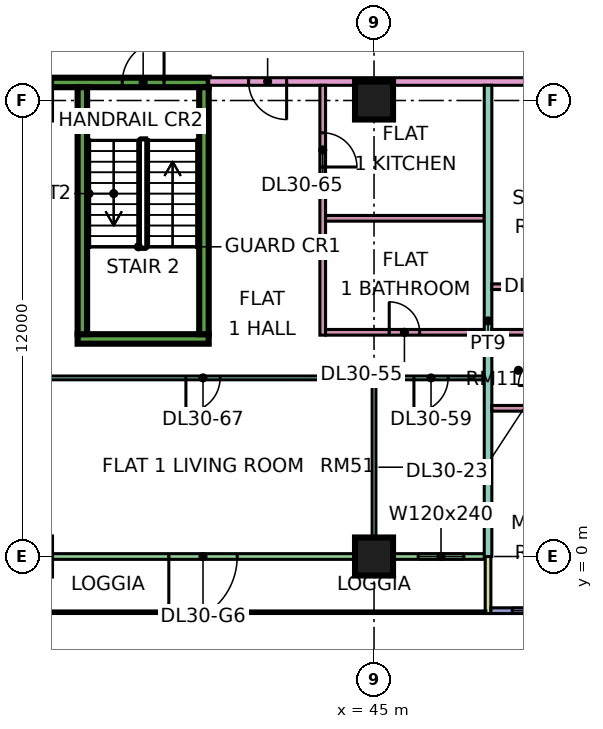
"""IFC4 building model, lengths in metres.
Left out: names, types, materials, properties, quantities, classifications, styles, units other than length and angle.
Written with IfcOpenShell. Run it as: python <this file> out.ifc"""

import sys

from ifc_helpers import new_model, si_unit, direction, frame, frame_2d, origin, origin_2d, place, context, subcontext, project, spatial, rectangle, extrude, element, fill, save


model = new_model("IFC4")
c1 = context("Model", 3, precision=1e-05, world=origin(), true_north=direction((0.0, 1.0)))
c2 = subcontext(c1, "Body", "Model", "MODEL_VIEW")
j1 = project(units=[si_unit("LENGTHUNIT", "METRE"), si_unit("PLANEANGLEUNIT", "RADIAN")], contexts=[c1])
p1 = place(None, origin())
s1 = spatial("IfcSite", under=j1, at=p1, CompositionType="ELEMENT")
p2 = place(p1, origin())
s2 = spatial("IfcBuilding", under=s1, at=p2, CompositionType="ELEMENT")
p3 = place(p2, frame((0.0, 0.0, 129.4)))
s3 = spatial("IfcBuildingStorey", under=s2, at=p3, CompositionType="ELEMENT", Elevation=129.4)
for number, where, z_axis, x_axis in (
    (1, (45.0, 0.0, 0.0), (0.0, 0.0, 1.0), (1.0, 0.0, 0.0)),
    (2, (45.0, 12.0, 0.0), (0.0, 0.0, 1.0), (1.0, 0.0, 0.0)),
):
    element("IfcColumn", number, at=place(p3, frame(where, z_axis=z_axis, x_axis=x_axis)), inside=s3, PredefinedType="COLUMN", context=c2, shape_type="SweptSolid", body=[
        extrude(rectangle(XDim=1.0, YDim=1.0, at=origin_2d()), origin(), (0.0, 0.0, 1.0), 3.75),
    ])
p4 = place(p3, frame((37.2, 5.725, 0.0), z_axis=(0.0, 0.0, 1.0), x_axis=(1.0, 0.0, 0.0)))
e3 = element("IfcWall", 3, at=p4, inside=s3, PredefinedType="SHEAR", context=c2, shape_type="SweptSolid", body=[
    extrude(rectangle(XDim=3.45, YDim=0.25, at=frame_2d((1.725, 0.0))), origin(), (0.0, 0.0, 1.0), 3.75),
])
p5 = place(p3, frame((36.5, 12.475, 0.0), z_axis=(0.0, 0.0, 1.0), x_axis=(1.0, 0.0, 0.0)))
e4 = element("IfcWall", 4, at=p5, inside=s3, PredefinedType="SHEAR", context=c2, shape_type="SweptSolid", body=[
    extrude(rectangle(XDim=4.15, YDim=0.25, at=frame_2d((2.075, 0.0))), origin(), (0.0, 0.0, 1.0), 3.75),
])
p6 = place(p5, frame((1.875, 0.0, 0.0)))
e5 = element("IfcOpeningElement", 5, at=p6, cuts=e4, PredefinedType="OPENING", context=c2, shape_type="SweptSolid", body=[
    extrude(rectangle(XDim=1.1, YDim=2.2, at=frame_2d((0.55, 1.1))), frame((0.0, 0.135, 0.0), z_axis=(0.0, -1.0, 0.0), x_axis=(1.0, 0.0, 0.0)), (0.0, 0.0, 1.0), 0.27),
])
for number, where, z_axis, x_axis in (
    (6, (37.325, 5.85, 0.0), (0.0, 0.0, 1.0), (0.0, 1.0, 0.0)),
    (7, (40.525, 5.85, 0.0), (0.0, 0.0, 1.0), (0.0, 1.0, 0.0)),
):
    element("IfcWall", number, at=place(p3, frame(where, z_axis=z_axis, x_axis=x_axis)), inside=s3, PredefinedType="SHEAR", context=c2, shape_type="SweptSolid", body=[
        extrude(rectangle(XDim=6.5, YDim=0.25, at=frame_2d((3.25, 0.0))), origin(), (0.0, 0.0, 1.0), 3.75),
    ])
p7 = place(p3, frame((36.075, 0.0, 0.0), z_axis=(0.0, 0.0, 1.0), x_axis=(1.0, 0.0, 0.0)))
e8 = element("IfcWall", 8, at=p7, inside=s3, PredefinedType="SOLIDWALL", context=c2, shape_type="SweptSolid", body=[
    extrude(rectangle(XDim=11.85, YDim=0.15, at=frame_2d((5.925, 0.0))), origin(), (0.0, 0.0, 1.0), 3.35),
])
p8 = place(p7, frame((3.525, 0.0, 0.0)))
e9 = element("IfcOpeningElement", 9, at=p8, cuts=e8, PredefinedType="OPENING", context=c2, shape_type="SweptSolid", body=[
    extrude(rectangle(XDim=1.8, YDim=2.4, at=frame_2d((0.9, 1.2))), frame((0.0, 0.085, 0.0), z_axis=(0.0, -1.0, 0.0), x_axis=(1.0, 0.0, 0.0)), (0.0, 0.0, 1.0), 0.17),
])
p9 = place(p7, frame((10.087, 0.0, 0.45)))
e10 = element("IfcOpeningElement", 10, at=p9, cuts=e8, PredefinedType="OPENING", context=c2, shape_type="SweptSolid", body=[
    extrude(rectangle(XDim=1.2, YDim=2.4, at=frame_2d((0.6, 1.2))), frame((0.0, 0.085, 0.0), z_axis=(0.0, -1.0, 0.0), x_axis=(1.0, 0.0, 0.0)), (0.0, 0.0, 1.0), 0.17),
])
p10 = place(p3, frame((48.0, -1.5, 0.0), z_axis=(0.0, 0.0, 1.0), x_axis=(0.0, 1.0, 0.0)))
e11 = element("IfcWall", 11, at=p10, inside=s3, PredefinedType="SOLIDWALL", context=c2, shape_type="SweptSolid", body=[
    extrude(rectangle(XDim=1.5, YDim=0.15, at=frame_2d((0.75, 0.0))), origin(), (0.0, 0.0, 1.0), 3.35),
])
p11 = place(p3, frame((48.075, -1.425, 0.0), z_axis=(0.0, 0.0, 1.0), x_axis=(1.0, 0.0, 0.0)))
e12 = element("IfcWall", 12, at=p11, inside=s3, PredefinedType="SOLIDWALL", context=c2, shape_type="SweptSolid", body=[
    extrude(rectangle(XDim=11.85, YDim=0.15, at=frame_2d((5.925, 0.0))), origin(), (0.0, 0.0, 1.0), 3.35),
])
p12 = place(p11, frame((0.562, 0.0, 0.45)))
e13 = element("IfcOpeningElement", 13, at=p12, cuts=e12, PredefinedType="OPENING", context=c2, shape_type="SweptSolid", body=[
    extrude(rectangle(XDim=1.8, YDim=2.4, at=frame_2d((0.9, 1.2))), frame((0.0, 0.085, 0.0), z_axis=(0.0, -1.0, 0.0), x_axis=(1.0, 0.0, 0.0)), (0.0, 0.0, 1.0), 0.17),
])
p13 = place(p11, frame((3.525, 0.0, 0.45)))
e14 = element("IfcOpeningElement", 14, at=p13, cuts=e12, PredefinedType="OPENING", context=c2, shape_type="SweptSolid", body=[
    extrude(rectangle(XDim=1.8, YDim=2.4, at=frame_2d((0.9, 1.2))), frame((0.0, 0.085, 0.0), z_axis=(0.0, -1.0, 0.0), x_axis=(1.0, 0.0, 0.0)), (0.0, 0.0, 1.0), 0.17),
])
p14 = place(p11, frame((6.525, 0.0, 0.45)))
e15 = element("IfcOpeningElement", 15, at=p14, cuts=e12, PredefinedType="OPENING", context=c2, shape_type="SweptSolid", body=[
    extrude(rectangle(XDim=1.8, YDim=2.4, at=frame_2d((0.9, 1.2))), frame((0.0, 0.085, 0.0), z_axis=(0.0, -1.0, 0.0), x_axis=(1.0, 0.0, 0.0)), (0.0, 0.0, 1.0), 0.17),
])
p15 = place(p11, frame((9.488, 0.0, 0.45)))
e16 = element("IfcOpeningElement", 16, at=p15, cuts=e12, PredefinedType="OPENING", context=c2, shape_type="SweptSolid", body=[
    extrude(rectangle(XDim=1.8, YDim=2.4, at=frame_2d((0.9, 1.2))), frame((0.0, 0.085, 0.0), z_axis=(0.0, -1.0, 0.0), x_axis=(1.0, 0.0, 0.0)), (0.0, 0.0, 1.0), 0.17),
])
p16 = place(p3, frame((33.05, 4.7, 0.0), z_axis=(0.0, 0.0, 1.0), x_axis=(1.0, 0.0, 0.0)))
e17 = element("IfcWall", 17, at=p16, inside=s3, PredefinedType="PARTITIONING", context=c2, shape_type="SweptSolid", body=[
    extrude(rectangle(XDim=14.85, YDim=0.1, at=frame_2d((7.425, 0.0))), origin(), (0.0, 0.0, 1.0), 3.35),
])
p17 = place(p16, frame((1.0, 0.0, 0.0)))
e18 = element("IfcOpeningElement", 18, at=p17, cuts=e17, PredefinedType="OPENING", context=c2, shape_type="SweptSolid", body=[
    extrude(rectangle(XDim=0.9, YDim=2.1, at=frame_2d((0.45, 1.05))), frame((0.0, 0.06, 0.0), z_axis=(0.0, -1.0, 0.0), x_axis=(1.0, 0.0, 0.0)), (0.0, 0.0, 1.0), 0.12),
])
p18 = place(p16, frame((13.0, 0.0, 0.0)))
e19 = element("IfcOpeningElement", 19, at=p18, cuts=e17, PredefinedType="OPENING", context=c2, shape_type="SweptSolid", body=[
    extrude(rectangle(XDim=0.9, YDim=2.1, at=frame_2d((0.45, 1.05))), frame((0.0, 0.06, 0.0), z_axis=(0.0, -1.0, 0.0), x_axis=(1.0, 0.0, 0.0)), (0.0, 0.0, 1.0), 0.12),
])
p19 = place(p16, frame((7.0, 0.0, 0.0)))
e20 = element("IfcOpeningElement", 20, at=p19, cuts=e17, PredefinedType="OPENING", context=c2, shape_type="SweptSolid", body=[
    extrude(rectangle(XDim=0.9, YDim=2.1, at=frame_2d((0.45, 1.05))), frame((0.0, 0.06, 0.0), z_axis=(0.0, -1.0, 0.0), x_axis=(1.0, 0.0, 0.0)), (0.0, 0.0, 1.0), 0.12),
])
p20 = place(p3, frame((40.65, 12.5, 0.0), z_axis=(0.0, 0.0, 1.0), x_axis=(1.0, 0.0, 0.0)))
e21 = element("IfcWall", 21, at=p20, inside=s3, PredefinedType="PARTITIONING", context=c2, shape_type="SweptSolid", body=[
    extrude(rectangle(XDim=31.276, YDim=0.2, at=frame_2d((15.638, 0.0))), origin(), (0.0, 0.0, 1.0), 3.35),
])
p21 = place(p20, frame((29.1, 0.0, 0.0)))
e22 = element("IfcOpeningElement", 22, at=p21, cuts=e21, PredefinedType="OPENING", context=c2, shape_type="SweptSolid", body=[
    extrude(rectangle(XDim=1.0, YDim=2.1, at=frame_2d((0.5, 1.05))), frame((0.0, 0.11, 0.0), z_axis=(0.0, -1.0, 0.0), x_axis=(1.0, 0.0, 0.0)), (0.0, 0.0, 1.0), 0.22),
])
p22 = place(p20, frame((1.05, 0.0, 0.0)))
e23 = element("IfcOpeningElement", 23, at=p22, cuts=e21, PredefinedType="OPENING", context=c2, shape_type="SweptSolid", body=[
    extrude(rectangle(XDim=1.0, YDim=2.1, at=frame_2d((0.5, 1.05))), frame((0.0, 0.11, 0.0), z_axis=(0.0, -1.0, 0.0), x_axis=(1.0, 0.0, 0.0)), (0.0, 0.0, 1.0), 0.22),
])
p23 = place(p3, frame((43.65, 5.825, 0.0), z_axis=(0.0, 0.0, 1.0), x_axis=(0.0, 1.0, 0.0)))
e24 = element("IfcWall", 24, at=p23, inside=s3, PredefinedType="PARTITIONING", context=c2, shape_type="SweptSolid", body=[
    extrude(rectangle(XDim=6.575, YDim=0.15, at=frame_2d((3.288, 0.0))), origin(), (0.0, 0.0, 1.0), 3.35),
])
p24 = place(p23, frame((4.425, 0.0, 0.0)))
e25 = element("IfcOpeningElement", 25, at=p24, cuts=e24, PredefinedType="OPENING", context=c2, shape_type="SweptSolid", body=[
    extrude(rectangle(XDim=0.9, YDim=2.1, at=frame_2d((0.45, 1.05))), frame((0.0, 0.085, 0.0), z_axis=(0.0, -1.0, 0.0), x_axis=(1.0, 0.0, 0.0)), (0.0, 0.0, 1.0), 0.17),
])
p25 = place(p3, frame((43.725, 5.9, 0.0), z_axis=(0.0, 0.0, 1.0), x_axis=(1.0, 0.0, 0.0)))
e26 = element("IfcWall", 26, at=p25, inside=s3, PredefinedType="PARTITIONING", context=c2, shape_type="SweptSolid", body=[
    extrude(rectangle(XDim=4.175, YDim=0.15, at=frame_2d((2.087, 0.0))), origin(), (0.0, 0.0, 1.0), 3.35),
])
p26 = place(p25, frame((1.675, 0.0, 0.0)))
e27 = element("IfcOpeningElement", 27, at=p26, cuts=e26, PredefinedType="OPENING", context=c2, shape_type="SweptSolid", body=[
    extrude(rectangle(XDim=0.8, YDim=2.1, at=frame_2d((0.4, 1.05))), frame((0.0, 0.085, 0.0), z_axis=(0.0, -1.0, 0.0), x_axis=(1.0, 0.0, 0.0)), (0.0, 0.0, 1.0), 0.17),
])
p27 = place(p3, frame((43.725, 8.9, 0.0), z_axis=(0.0, 0.0, 1.0), x_axis=(1.0, 0.0, 0.0)))
e28 = element("IfcWall", 28, at=p27, inside=s3, PredefinedType="PARTITIONING", context=c2, shape_type="SweptSolid", body=[
    extrude(rectangle(XDim=4.175, YDim=0.15, at=frame_2d((2.087, 0.0))), origin(), (0.0, 0.0, 1.0), 3.35),
])
p28 = place(p3, frame((45.0, 0.074, 0.0), z_axis=(0.0, 0.0, 1.0), x_axis=(0.0, 1.0, 0.0)))
e29 = element("IfcWall", 29, at=p28, inside=s3, PredefinedType="PARTITIONING", context=c2, shape_type="SweptSolid", body=[
    extrude(rectangle(XDim=4.576, YDim=0.1, at=frame_2d((2.288, 0.0))), origin(), (0.0, 0.0, 1.0), 3.35),
])
p29 = place(p3, frame((48.0, 0.0, 0.0), z_axis=(0.0, 0.0, 1.0), x_axis=(0.0, 1.0, 0.0)))
e30 = element("IfcWall", 30, at=p29, inside=s3, PredefinedType="PARTITIONING", context=c2, shape_type="SweptSolid", body=[
    extrude(rectangle(XDim=12.4, YDim=0.2, at=frame_2d((6.2, 0.0))), origin(), (0.0, 0.0, 1.0), 3.35),
])
p30 = place(p3, frame((48.1, 3.9, 0.0), z_axis=(0.0, 0.0, 1.0), x_axis=(1.0, 0.0, 0.0)))
e31 = element("IfcWall", 31, at=p30, inside=s3, PredefinedType="PARTITIONING", context=c2, shape_type="SweptSolid", body=[
    extrude(rectangle(XDim=1.425, YDim=0.15, at=frame_2d((0.712, 0.0))), origin(), (0.0, 0.0, 1.0), 3.35),
])
p31 = place(p3, frame((48.1, 5.9, 0.0), z_axis=(0.0, 0.0, 1.0), x_axis=(1.0, 0.0, 0.0)))
e32 = element("IfcWall", 32, at=p31, inside=s3, PredefinedType="PARTITIONING", context=c2, shape_type="SweptSolid", body=[
    extrude(rectangle(XDim=25.25, YDim=0.15, at=frame_2d((12.625, 0.0))), origin(), (0.0, 0.0, 1.0), 3.35),
])
p32 = place(p31, frame((6.95, 0.0, 0.0)))
e33 = element("IfcOpeningElement", 33, at=p32, cuts=e32, PredefinedType="OPENING", context=c2, shape_type="SweptSolid", body=[
    extrude(rectangle(XDim=0.9, YDim=2.1, at=frame_2d((0.45, 1.05))), frame((0.0, 0.085, 0.0), z_axis=(0.0, -1.0, 0.0), x_axis=(1.0, 0.0, 0.0)), (0.0, 0.0, 1.0), 0.17),
])
p33 = place(p31, frame((9.95, 0.0, 0.0)))
e34 = element("IfcOpeningElement", 34, at=p33, cuts=e32, PredefinedType="OPENING", context=c2, shape_type="SweptSolid", body=[
    extrude(rectangle(XDim=0.9, YDim=2.1, at=frame_2d((0.45, 1.05))), frame((0.0, 0.085, 0.0), z_axis=(0.0, -1.0, 0.0), x_axis=(1.0, 0.0, 0.0)), (0.0, 0.0, 1.0), 0.17),
])
p34 = place(p31, frame((15.95, 0.0, 0.0)))
e35 = element("IfcOpeningElement", 35, at=p34, cuts=e32, PredefinedType="OPENING", context=c2, shape_type="SweptSolid", body=[
    extrude(rectangle(XDim=0.9, YDim=2.1, at=frame_2d((0.45, 1.05))), frame((0.0, 0.085, 0.0), z_axis=(0.0, -1.0, 0.0), x_axis=(1.0, 0.0, 0.0)), (0.0, 0.0, 1.0), 0.17),
])
p35 = place(p31, frame((20.45, 0.0, 0.0)))
e36 = element("IfcOpeningElement", 36, at=p35, cuts=e32, PredefinedType="OPENING", context=c2, shape_type="SweptSolid", body=[
    extrude(rectangle(XDim=0.9, YDim=2.1, at=frame_2d((0.45, 1.05))), frame((0.0, 0.085, 0.0), z_axis=(0.0, -1.0, 0.0), x_axis=(1.0, 0.0, 0.0)), (0.0, 0.0, 1.0), 0.17),
])
p36 = place(p31, frame((1.8, 0.0, 0.0)))
e37 = element("IfcOpeningElement", 37, at=p36, cuts=e32, PredefinedType="OPENING", context=c2, shape_type="SweptSolid", body=[
    extrude(rectangle(XDim=0.8, YDim=2.1, at=frame_2d((0.4, 1.05))), frame((0.0, 0.085, 0.0), z_axis=(0.0, -1.0, 0.0), x_axis=(1.0, 0.0, 0.0)), (0.0, 0.0, 1.0), 0.17),
])
p37 = place(p31, frame((3.65, 0.0, 0.0)))
e38 = element("IfcOpeningElement", 38, at=p37, cuts=e32, PredefinedType="OPENING", context=c2, shape_type="SweptSolid", body=[
    extrude(rectangle(XDim=1.6, YDim=2.1, at=frame_2d((0.8, 1.05))), frame((0.0, 0.085, 0.0), z_axis=(0.0, -1.0, 0.0), x_axis=(1.0, 0.0, 0.0)), (0.0, 0.0, 1.0), 0.17),
])
p38 = place(p3, frame((48.1, 7.1, 0.0), z_axis=(0.0, 0.0, 1.0), x_axis=(1.0, 0.0, 0.0)))
e39 = element("IfcWall", 39, at=p38, inside=s3, PredefinedType="PARTITIONING", context=c2, shape_type="SweptSolid", body=[
    extrude(rectangle(XDim=20.35, YDim=0.15, at=frame_2d((10.175, 0.0))), origin(), (0.0, 0.0, 1.0), 3.35),
])
p39 = place(p38, frame((16.05, 0.0, 0.0)))
e40 = element("IfcOpeningElement", 40, at=p39, cuts=e39, PredefinedType="OPENING", context=c2, shape_type="SweptSolid", body=[
    extrude(rectangle(XDim=0.8, YDim=2.1, at=frame_2d((0.4, 1.05))), frame((0.0, 0.085, 0.0), z_axis=(0.0, -1.0, 0.0), x_axis=(1.0, 0.0, 0.0)), (0.0, 0.0, 1.0), 0.17),
])
p40 = place(p38, frame((11.6, 0.0, 0.0)))
e41 = element("IfcOpeningElement", 41, at=p40, cuts=e39, PredefinedType="OPENING", context=c2, shape_type="SweptSolid", body=[
    extrude(rectangle(XDim=0.9, YDim=2.1, at=frame_2d((0.45, 1.05))), frame((0.0, 0.085, 0.0), z_axis=(0.0, -1.0, 0.0), x_axis=(1.0, 0.0, 0.0)), (0.0, 0.0, 1.0), 0.17),
])
p41 = place(p38, frame((3.9, 0.0, 0.0)))
e42 = element("IfcOpeningElement", 42, at=p41, cuts=e39, PredefinedType="OPENING", context=c2, shape_type="SweptSolid", body=[
    extrude(rectangle(XDim=0.8, YDim=2.1, at=frame_2d((0.4, 1.05))), frame((0.0, 0.085, 0.0), z_axis=(0.0, -1.0, 0.0), x_axis=(1.0, 0.0, 0.0)), (0.0, 0.0, 1.0), 0.17),
])
p42 = place(p38, frame((0.95, 0.0, 0.0)))
e43 = element("IfcOpeningElement", 43, at=p42, cuts=e39, PredefinedType="OPENING", context=c2, shape_type="SweptSolid", body=[
    extrude(rectangle(XDim=0.9, YDim=2.1, at=frame_2d((0.45, 1.05))), frame((0.0, 0.085, 0.0), z_axis=(0.0, -1.0, 0.0), x_axis=(1.0, 0.0, 0.0)), (0.0, 0.0, 1.0), 0.17),
])
p43 = place(p38, frame((7.05, 0.0, 0.0)))
e44 = element("IfcOpeningElement", 44, at=p43, cuts=e39, PredefinedType="OPENING", context=c2, shape_type="SweptSolid", body=[
    extrude(rectangle(XDim=0.8, YDim=2.1, at=frame_2d((0.4, 1.05))), frame((0.0, 0.085, 0.0), z_axis=(0.0, -1.0, 0.0), x_axis=(1.0, 0.0, 0.0)), (0.0, 0.0, 1.0), 0.17),
])
p44 = place(p8, frame((1.8, 0.0, 0.0), z_axis=(0.0, 0.0, 1.0), x_axis=(-1.0, 0.0, 0.0)))
e45 = element("IfcDoor", 45, at=p44, inside=s3, OperationType="DOUBLE_DOOR_SINGLE_SWING", PredefinedType="DOOR", context=c2, shape_type="SweptSolid", body=[
    extrude(rectangle(XDim=1.8, YDim=2.4, at=frame_2d((0.9, 1.2))), frame((0.0, 0.025, 0.0), z_axis=(0.0, -1.0, 0.0), x_axis=(1.0, 0.0, 0.0)), (0.0, 0.0, 1.0), 0.05),
])
fill(e9, e45)
p45 = place(p9, origin())
e46 = element("IfcWindow", 46, at=p45, inside=s3, PartitioningType="SINGLE_PANEL", PredefinedType="WINDOW", context=c2, shape_type="SweptSolid", body=[
    extrude(rectangle(XDim=1.2, YDim=2.4, at=frame_2d((0.6, 1.2))), frame((0.0, 0.03, 0.0), z_axis=(0.0, -1.0, 0.0), x_axis=(1.0, 0.0, 0.0)), (0.0, 0.0, 1.0), 0.06),
])
fill(e10, e46)
p46 = place(p12, origin())
e47 = element("IfcWindow", 47, at=p46, inside=s3, PartitioningType="SINGLE_PANEL", PredefinedType="WINDOW", context=c2, shape_type="SweptSolid", body=[
    extrude(rectangle(XDim=1.8, YDim=2.4, at=frame_2d((0.9, 1.2))), frame((0.0, 0.03, 0.0), z_axis=(0.0, -1.0, 0.0), x_axis=(1.0, 0.0, 0.0)), (0.0, 0.0, 1.0), 0.06),
])
fill(e13, e47)
p47 = place(p6, frame((1.1, 0.0, 0.0), z_axis=(0.0, 0.0, 1.0), x_axis=(-1.0, 0.0, 0.0)))
e48 = element("IfcDoor", 48, at=p47, inside=s3, OperationType="SINGLE_SWING_RIGHT", PredefinedType="DOOR", context=c2, shape_type="SweptSolid", body=[
    extrude(rectangle(XDim=1.1, YDim=2.2, at=frame_2d((0.55, 1.1))), frame((0.0, 0.025, 0.0), z_axis=(0.0, -1.0, 0.0), x_axis=(1.0, 0.0, 0.0)), (0.0, 0.0, 1.0), 0.05),
])
fill(e5, e48)
p48 = place(p26, origin())
e49 = element("IfcDoor", 49, at=p48, inside=s3, OperationType="SINGLE_SWING_LEFT", PredefinedType="DOOR", context=c2, shape_type="SweptSolid", body=[
    extrude(rectangle(XDim=0.8, YDim=2.1, at=frame_2d((0.4, 1.05))), frame((0.0, 0.025, 0.0), z_axis=(0.0, -1.0, 0.0), x_axis=(1.0, 0.0, 0.0)), (0.0, 0.0, 1.0), 0.05),
])
fill(e27, e49)
p49 = place(p18, frame((0.9, 0.0, 0.0), z_axis=(0.0, 0.0, 1.0), x_axis=(-1.0, 0.0, 0.0)))
e50 = element("IfcDoor", 50, at=p49, inside=s3, OperationType="SINGLE_SWING_LEFT", PredefinedType="DOOR", context=c2, shape_type="SweptSolid", body=[
    extrude(rectangle(XDim=0.9, YDim=2.1, at=frame_2d((0.45, 1.05))), frame((0.0, 0.025, 0.0), z_axis=(0.0, -1.0, 0.0), x_axis=(1.0, 0.0, 0.0)), (0.0, 0.0, 1.0), 0.05),
])
fill(e19, e50)
p50 = place(p22, origin())
e51 = element("IfcDoor", 51, at=p50, inside=s3, OperationType="SINGLE_SWING_RIGHT", PredefinedType="DOOR", context=c2, shape_type="SweptSolid", body=[
    extrude(rectangle(XDim=1.0, YDim=2.1, at=frame_2d((0.5, 1.05))), frame((0.0, 0.025, 0.0), z_axis=(0.0, -1.0, 0.0), x_axis=(1.0, 0.0, 0.0)), (0.0, 0.0, 1.0), 0.05),
])
fill(e23, e51)
p51 = place(p24, frame((0.9, 0.0, 0.0), z_axis=(0.0, 0.0, 1.0), x_axis=(-1.0, 0.0, 0.0)))
e52 = element("IfcDoor", 52, at=p51, inside=s3, OperationType="SINGLE_SWING_LEFT", PredefinedType="DOOR", context=c2, shape_type="SweptSolid", body=[
    extrude(rectangle(XDim=0.9, YDim=2.1, at=frame_2d((0.45, 1.05))), frame((0.0, 0.025, 0.0), z_axis=(0.0, -1.0, 0.0), x_axis=(1.0, 0.0, 0.0)), (0.0, 0.0, 1.0), 0.05),
])
fill(e25, e52)
p52 = place(p19, frame((0.9, 0.0, 0.0), z_axis=(0.0, 0.0, 1.0), x_axis=(-1.0, 0.0, 0.0)))
e53 = element("IfcDoor", 53, at=p52, inside=s3, OperationType="SINGLE_SWING_LEFT", PredefinedType="DOOR", context=c2, shape_type="SweptSolid", body=[
    extrude(rectangle(XDim=0.9, YDim=2.1, at=frame_2d((0.45, 1.05))), frame((0.0, 0.025, 0.0), z_axis=(0.0, -1.0, 0.0), x_axis=(1.0, 0.0, 0.0)), (0.0, 0.0, 1.0), 0.05),
])
fill(e20, e53)
save(model, sys.argv[1])
